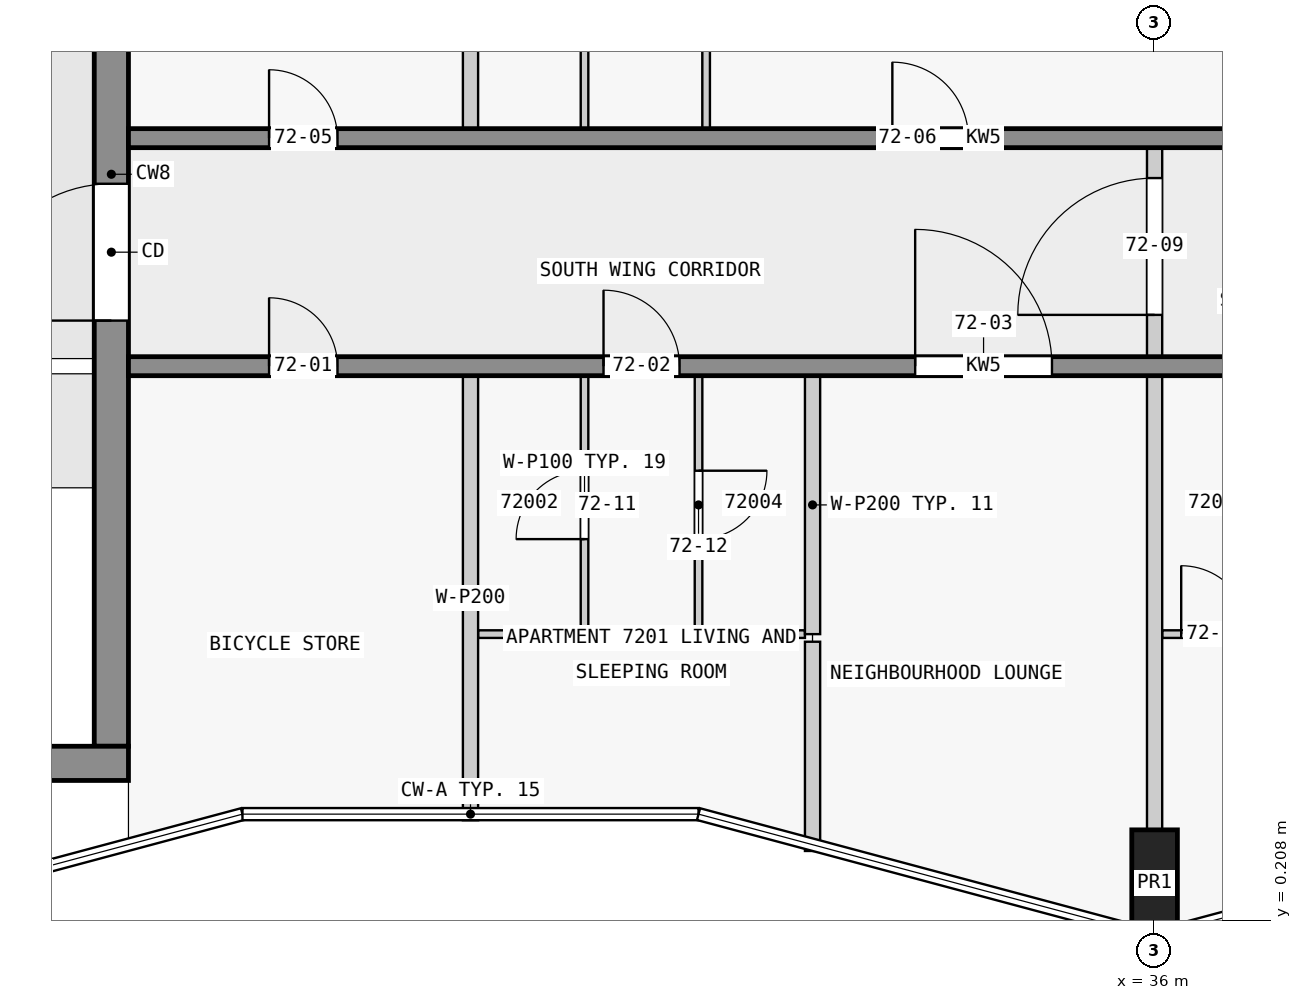
"""IFC4 building model, lengths in metres.
Left out: names, types, materials, properties, quantities, classifications, styles, units other than length and angle.
Written with IfcOpenShell. Run it as: python <this file> out.ifc"""

import sys

from ifc_helpers import new_model, si_unit, direction, frame, frame_2d, origin, origin_2d, place, context, subcontext, project, spatial, rectangle, extrude, element, fill, save


model = new_model("IFC4")
c1 = context("Model", 3, precision=1e-05, world=origin(), true_north=direction((0.0, 1.0)))
c2 = subcontext(c1, "Body", "Model", "MODEL_VIEW")
j1 = project(units=[si_unit("LENGTHUNIT", "METRE"), si_unit("PLANEANGLEUNIT", "RADIAN")], contexts=[c1])
p1 = place(None, origin())
s1 = spatial("IfcSite", under=j1, at=p1, CompositionType="ELEMENT")
p2 = place(p1, origin())
s2 = spatial("IfcBuilding", under=s1, at=p2, CompositionType="ELEMENT")
p3 = place(p2, frame((0.0, 0.0, 273.9)))
s3 = spatial("IfcBuildingStorey", under=s2, at=p3, CompositionType="ELEMENT", Elevation=273.9)
p4 = place(p3, frame((36.0, 0.7, 0.0), z_axis=(0.0, 0.0, 1.0), x_axis=(1.0, 0.0, 0.0)))
e1 = element("IfcColumn", 1, at=p4, inside=s3, PredefinedType="COLUMN", context=c2, shape_type="SweptSolid", body=[
    extrude(rectangle(XDim=0.6, YDim=1.4, at=origin_2d()), origin(), (0.0, 0.0, 1.0), 3.5),
])
p5 = place(p3, frame((1.85, 2.275, 0.0), z_axis=(0.0, 0.0, 1.0), x_axis=(1.0, 0.0, 0.0)))
e2 = element("IfcWall", 2, at=p5, inside=s3, PredefinedType="SHEAR", context=c2, shape_type="SweptSolid", body=[
    extrude(rectangle(XDim=20.65, YDim=0.45, at=frame_2d((10.325, 0.0))), origin(), (0.0, 0.0, 1.0), 3.25),
])
p6 = place(p3, frame((22.275, 2.5, 0.0), z_axis=(0.0, 0.0, 1.0), x_axis=(0.0, 1.0, 0.0)))
e3 = element("IfcWall", 3, at=p6, inside=s3, PredefinedType="SHEAR", context=c2, shape_type="SweptSolid", body=[
    extrude(rectangle(XDim=15.05, YDim=0.45, at=frame_2d((7.525, 0.0))), origin(), (0.0, 0.0, 1.0), 3.25),
])
p7 = place(p6, frame((5.6, 0.0, 0.0)))
e4 = element("IfcOpeningElement", 4, at=p7, cuts=e3, PredefinedType="OPENING", context=c2, shape_type="SweptSolid", body=[
    extrude(rectangle(XDim=1.8, YDim=2.1, at=frame_2d((0.9, 1.05))), frame((0.0, 0.235, 0.0), z_axis=(0.0, -1.0, 0.0), x_axis=(1.0, 0.0, 0.0)), (0.0, 0.0, 1.0), 0.47),
])
p8 = place(p3, frame((22.5, 7.5, 0.0), z_axis=(0.0, 0.0, 1.0), x_axis=(1.0, 0.0, 0.0)))
e5 = element("IfcWall", 5, at=p8, inside=s3, PredefinedType="SHEAR", context=c2, shape_type="SweptSolid", body=[
    extrude(rectangle(XDim=22.5, YDim=0.25, at=frame_2d((11.25, 0.0))), origin(), (0.0, 0.0, 1.0), 3.25),
])
p9 = place(p8, frame((1.85, 0.0, 0.0)))
e6 = element("IfcOpeningElement", 6, at=p9, cuts=e5, PredefinedType="OPENING", context=c2, shape_type="SweptSolid", body=[
    extrude(rectangle(XDim=0.9, YDim=2.1, at=frame_2d((0.45, 1.05))), frame((0.0, 0.135, 0.0), z_axis=(0.0, -1.0, 0.0), x_axis=(1.0, 0.0, 0.0)), (0.0, 0.0, 1.0), 0.27),
])
p10 = place(p8, frame((6.25, 0.0, 0.0)))
e7 = element("IfcOpeningElement", 7, at=p10, cuts=e5, PredefinedType="OPENING", context=c2, shape_type="SweptSolid", body=[
    extrude(rectangle(XDim=1.0, YDim=2.1, at=frame_2d((0.5, 1.05))), frame((0.0, 0.135, 0.0), z_axis=(0.0, -1.0, 0.0), x_axis=(1.0, 0.0, 0.0)), (0.0, 0.0, 1.0), 0.27),
])
p11 = place(p8, frame((10.35, 0.0, 0.0)))
e8 = element("IfcOpeningElement", 8, at=p11, cuts=e5, PredefinedType="OPENING", context=c2, shape_type="SweptSolid", body=[
    extrude(rectangle(XDim=1.8, YDim=2.1, at=frame_2d((0.9, 1.05))), frame((0.0, 0.135, 0.0), z_axis=(0.0, -1.0, 0.0), x_axis=(1.0, 0.0, 0.0)), (0.0, 0.0, 1.0), 0.27),
])
p12 = place(p8, frame((16.85, 0.0, 0.0)))
e9 = element("IfcOpeningElement", 9, at=p12, cuts=e5, PredefinedType="OPENING", context=c2, shape_type="SweptSolid", body=[
    extrude(rectangle(XDim=1.0, YDim=2.1, at=frame_2d((0.5, 1.05))), frame((0.0, 0.135, 0.0), z_axis=(0.0, -1.0, 0.0), x_axis=(1.0, 0.0, 0.0)), (0.0, 0.0, 1.0), 0.27),
])
p13 = place(p3, frame((22.5, 10.5, 0.0), z_axis=(0.0, 0.0, 1.0), x_axis=(1.0, 0.0, 0.0)))
e10 = element("IfcWall", 10, at=p13, inside=s3, PredefinedType="SHEAR", context=c2, shape_type="SweptSolid", body=[
    extrude(rectangle(XDim=22.5, YDim=0.25, at=frame_2d((11.25, 0.0))), origin(), (0.0, 0.0, 1.0), 3.25),
])
p14 = place(p13, frame((1.85, 0.0, 0.0)))
e11 = element("IfcOpeningElement", 11, at=p14, cuts=e10, PredefinedType="OPENING", context=c2, shape_type="SweptSolid", body=[
    extrude(rectangle(XDim=0.9, YDim=2.1, at=frame_2d((0.45, 1.05))), frame((0.0, 0.135, 0.0), z_axis=(0.0, -1.0, 0.0), x_axis=(1.0, 0.0, 0.0)), (0.0, 0.0, 1.0), 0.27),
])
p15 = place(p13, frame((10.05, 0.0, 0.0)))
e12 = element("IfcOpeningElement", 12, at=p15, cuts=e10, PredefinedType="OPENING", context=c2, shape_type="SweptSolid", body=[
    extrude(rectangle(XDim=1.0, YDim=2.1, at=frame_2d((0.5, 1.05))), frame((0.0, 0.135, 0.0), z_axis=(0.0, -1.0, 0.0), x_axis=(1.0, 0.0, 0.0)), (0.0, 0.0, 1.0), 0.27),
])
p16 = place(p13, frame((18.75, 0.0, 0.0)))
e13 = element("IfcOpeningElement", 13, at=p16, cuts=e10, PredefinedType="OPENING", context=c2, shape_type="SweptSolid", body=[
    extrude(rectangle(XDim=0.9, YDim=2.1, at=frame_2d((0.45, 1.05))), frame((0.0, 0.135, 0.0), z_axis=(0.0, -1.0, 0.0), x_axis=(1.0, 0.0, 0.0)), (0.0, 0.0, 1.0), 0.27),
])
p17 = place(p13, frame((20.95, 0.0, 0.0)))
e14 = element("IfcOpeningElement", 14, at=p17, cuts=e10, PredefinedType="OPENING", context=c2, shape_type="SweptSolid", body=[
    extrude(rectangle(XDim=1.0, YDim=2.1, at=frame_2d((0.5, 1.05))), frame((0.0, 0.135, 0.0), z_axis=(0.0, -1.0, 0.0), x_axis=(1.0, 0.0, 0.0)), (0.0, 0.0, 1.0), 0.27),
])
for number, where, z_axis, x_axis in (
    (15, (27.1, 3.975, 0.0), (0.0, 0.0, 1.0), (1.0, 0.0, 0.0)),
    (16, (30.05, 3.975, 0.0), (0.0, 0.0, 1.0), (1.0, 0.0, 0.0)),
):
    element("IfcWall", number, at=place(p3, frame(where, z_axis=z_axis, x_axis=x_axis)), inside=s3, PredefinedType="PARTITIONING", context=c2, shape_type="SweptSolid", body=[
        extrude(rectangle(XDim=1.35, YDim=0.1, at=frame_2d((0.675, 0.0))), origin(), (0.0, 0.0, 1.0), 3.25),
    ])
p18 = place(p3, frame((36.1, 3.975, 0.0), z_axis=(0.0, 0.0, 1.0), x_axis=(1.0, 0.0, 0.0)))
e17 = element("IfcWall", 17, at=p18, inside=s3, PredefinedType="PARTITIONING", context=c2, shape_type="SweptSolid", body=[
    extrude(rectangle(XDim=1.45, YDim=0.1, at=frame_2d((0.725, 0.0))), origin(), (0.0, 0.0, 1.0), 3.25),
])
p19 = place(p18, frame((0.25, 0.0, 0.0)))
e18 = element("IfcOpeningElement", 18, at=p19, cuts=e17, PredefinedType="OPENING", context=c2, shape_type="SweptSolid", body=[
    extrude(rectangle(XDim=0.9, YDim=2.1, at=frame_2d((0.45, 1.05))), frame((0.0, 0.06, 0.0), z_axis=(0.0, -1.0, 0.0), x_axis=(1.0, 0.0, 0.0)), (0.0, 0.0, 1.0), 0.12),
])
for number, where, z_axis, x_axis in (
    (19, (27.0, 1.527, 0.0), (0.0, 0.0, 1.0), (0.0, 1.0, 0.0)),
    (20, (27.0, 10.625, 0.0), (0.0, 0.0, 1.0), (0.0, 1.0, 0.0)),
):
    element("IfcWall", number, at=place(p3, frame(where, z_axis=z_axis, x_axis=x_axis)), inside=s3, PredefinedType="PARTITIONING", context=c2, shape_type="SweptSolid", body=[
        extrude(rectangle(XDim=5.848, YDim=0.2, at=frame_2d((2.924, 0.0))), origin(), (0.0, 0.0, 1.0), 3.25),
    ])
p20 = place(p3, frame((28.5, 3.975, 0.0), z_axis=(0.0, 0.0, 1.0), x_axis=(0.0, 1.0, 0.0)))
e21 = element("IfcWall", 21, at=p20, inside=s3, PredefinedType="PARTITIONING", context=c2, shape_type="SweptSolid", body=[
    extrude(rectangle(XDim=3.4, YDim=0.1, at=frame_2d((1.7, 0.0))), origin(), (0.0, 0.0, 1.0), 3.25),
])
p21 = place(p20, frame((1.25, 0.0, 0.0)))
e22 = element("IfcOpeningElement", 22, at=p21, cuts=e21, PredefinedType="OPENING", context=c2, shape_type="SweptSolid", body=[
    extrude(rectangle(XDim=0.9, YDim=2.1, at=frame_2d((0.45, 1.05))), frame((0.0, 0.06, 0.0), z_axis=(0.0, -1.0, 0.0), x_axis=(1.0, 0.0, 0.0)), (0.0, 0.0, 1.0), 0.12),
])
p22 = place(p3, frame((28.5, 10.625, 0.0), z_axis=(0.0, 0.0, 1.0), x_axis=(0.0, 1.0, 0.0)))
e23 = element("IfcWall", 23, at=p22, inside=s3, PredefinedType="PARTITIONING", context=c2, shape_type="SweptSolid", body=[
    extrude(rectangle(XDim=3.4, YDim=0.1, at=frame_2d((1.7, 0.0))), origin(), (0.0, 0.0, 1.0), 3.25),
])
p23 = place(p3, frame((30.0, 7.375, 0.0), z_axis=(0.0, 0.0, 1.0), x_axis=(0.0, -1.0, 0.0)))
e24 = element("IfcWall", 24, at=p23, inside=s3, PredefinedType="PARTITIONING", context=c2, shape_type="SweptSolid", body=[
    extrude(rectangle(XDim=3.4, YDim=0.1, at=frame_2d((1.7, 0.0))), origin(), (0.0, 0.0, 1.0), 3.25),
])
p24 = place(p23, frame((1.25, 0.0, 0.0)))
e25 = element("IfcOpeningElement", 25, at=p24, cuts=e24, PredefinedType="OPENING", context=c2, shape_type="SweptSolid", body=[
    extrude(rectangle(XDim=0.9, YDim=2.1, at=frame_2d((0.45, 1.05))), frame((0.0, 0.06, 0.0), z_axis=(0.0, -1.0, 0.0), x_axis=(1.0, 0.0, 0.0)), (0.0, 0.0, 1.0), 0.12),
])
p25 = place(p3, frame((30.1, 10.625, 0.0), z_axis=(0.0, 0.0, 1.0), x_axis=(0.0, 1.0, 0.0)))
e26 = element("IfcWall", 26, at=p25, inside=s3, PredefinedType="PARTITIONING", context=c2, shape_type="SweptSolid", body=[
    extrude(rectangle(XDim=3.4, YDim=0.1, at=frame_2d((1.7, 0.0))), origin(), (0.0, 0.0, 1.0), 3.25),
])
p26 = place(p25, frame((1.25, 0.0, 0.0)))
e27 = element("IfcOpeningElement", 27, at=p26, cuts=e26, PredefinedType="OPENING", context=c2, shape_type="SweptSolid", body=[
    extrude(rectangle(XDim=0.9, YDim=2.1, at=frame_2d((0.45, 1.05))), frame((0.0, 0.06, 0.0), z_axis=(0.0, -1.0, 0.0), x_axis=(1.0, 0.0, 0.0)), (0.0, 0.0, 1.0), 0.12),
])
p27 = place(p3, frame((31.5, 3.875, 0.0), z_axis=(0.0, 0.0, 1.0), x_axis=(0.0, -1.0, 0.0)))
e28 = element("IfcWall", 28, at=p27, inside=s3, PredefinedType="PARTITIONING", context=c2, shape_type="SweptSolid", body=[
    extrude(rectangle(XDim=2.753, YDim=0.2, at=frame_2d((1.376, 0.0))), origin(), (0.0, 0.0, 1.0), 3.25),
])
p28 = place(p3, frame((31.5, 3.975, 0.0), z_axis=(0.0, 0.0, 1.0), x_axis=(0.0, 1.0, 0.0)))
e29 = element("IfcWall", 29, at=p28, inside=s3, PredefinedType="PARTITIONING", context=c2, shape_type="SweptSolid", body=[
    extrude(rectangle(XDim=3.4, YDim=0.2, at=frame_2d((1.7, 0.0))), origin(), (0.0, 0.0, 1.0), 3.25),
])
p29 = place(p3, frame((36.0, 1.4, 0.0), z_axis=(0.0, 0.0, 1.0), x_axis=(0.0, 1.0, 0.0)))
e30 = element("IfcWall", 30, at=p29, inside=s3, PredefinedType="PARTITIONING", context=c2, shape_type="SweptSolid", body=[
    extrude(rectangle(XDim=5.975, YDim=0.2, at=frame_2d((2.988, 0.0))), origin(), (0.0, 0.0, 1.0), 3.25),
])
p30 = place(p3, frame((36.0, 7.475, 0.0), z_axis=(0.0, 0.0, 1.0), x_axis=(0.0, 1.0, 0.0)))
e31 = element("IfcWall", 31, at=p30, inside=s3, PredefinedType="PARTITIONING", context=c2, shape_type="SweptSolid", body=[
    extrude(rectangle(XDim=3.15, YDim=0.2, at=frame_2d((1.575, 0.0))), origin(), (0.0, 0.0, 1.0), 3.25),
])
p31 = place(p30, frame((0.7, 0.0, 0.0)))
e32 = element("IfcOpeningElement", 32, at=p31, cuts=e31, PredefinedType="OPENING", context=c2, shape_type="SweptSolid", body=[
    extrude(rectangle(XDim=1.8, YDim=2.1, at=frame_2d((0.9, 1.05))), frame((0.0, 0.11, 0.0), z_axis=(0.0, -1.0, 0.0), x_axis=(1.0, 0.0, 0.0)), (0.0, 0.0, 1.0), 0.22),
])
p32 = place(p7, origin())
e33 = element("IfcDoor", 33, at=p32, inside=s3, OperationType="DOUBLE_DOOR_SINGLE_SWING", PredefinedType="DOOR", context=c2, shape_type="SweptSolid", body=[
    extrude(rectangle(XDim=1.8, YDim=2.1, at=frame_2d((0.9, 1.05))), frame((0.0, 0.025, 0.0), z_axis=(0.0, -1.0, 0.0), x_axis=(1.0, 0.0, 0.0)), (0.0, 0.0, 1.0), 0.05),
])
fill(e4, e33)
p33 = place(p9, origin())
e34 = element("IfcDoor", 34, at=p33, inside=s3, OperationType="SINGLE_SWING_LEFT", PredefinedType="DOOR", context=c2, shape_type="SweptSolid", body=[
    extrude(rectangle(XDim=0.9, YDim=2.1, at=frame_2d((0.45, 1.05))), frame((0.0, 0.025, 0.0), z_axis=(0.0, -1.0, 0.0), x_axis=(1.0, 0.0, 0.0)), (0.0, 0.0, 1.0), 0.05),
])
fill(e6, e34)
p34 = place(p10, origin())
e35 = element("IfcDoor", 35, at=p34, inside=s3, OperationType="SINGLE_SWING_LEFT", PredefinedType="DOOR", context=c2, shape_type="SweptSolid", body=[
    extrude(rectangle(XDim=1.0, YDim=2.1, at=frame_2d((0.5, 1.05))), frame((0.0, 0.025, 0.0), z_axis=(0.0, -1.0, 0.0), x_axis=(1.0, 0.0, 0.0)), (0.0, 0.0, 1.0), 0.05),
])
fill(e7, e35)
p35 = place(p11, origin())
e36 = element("IfcDoor", 36, at=p35, inside=s3, OperationType="SINGLE_SWING_LEFT", PredefinedType="DOOR", context=c2, shape_type="SweptSolid", body=[
    extrude(rectangle(XDim=1.8, YDim=2.1, at=frame_2d((0.9, 1.05))), frame((0.0, 0.025, 0.0), z_axis=(0.0, -1.0, 0.0), x_axis=(1.0, 0.0, 0.0)), (0.0, 0.0, 1.0), 0.05),
])
fill(e8, e36)
p36 = place(p14, origin())
e37 = element("IfcDoor", 37, at=p36, inside=s3, OperationType="SINGLE_SWING_LEFT", PredefinedType="DOOR", context=c2, shape_type="SweptSolid", body=[
    extrude(rectangle(XDim=0.9, YDim=2.1, at=frame_2d((0.45, 1.05))), frame((0.0, 0.025, 0.0), z_axis=(0.0, -1.0, 0.0), x_axis=(1.0, 0.0, 0.0)), (0.0, 0.0, 1.0), 0.05),
])
fill(e11, e37)
p37 = place(p15, origin())
e38 = element("IfcDoor", 38, at=p37, inside=s3, OperationType="SINGLE_SWING_LEFT", PredefinedType="DOOR", context=c2, shape_type="SweptSolid", body=[
    extrude(rectangle(XDim=1.0, YDim=2.1, at=frame_2d((0.5, 1.05))), frame((0.0, 0.025, 0.0), z_axis=(0.0, -1.0, 0.0), x_axis=(1.0, 0.0, 0.0)), (0.0, 0.0, 1.0), 0.05),
])
fill(e12, e38)
p38 = place(p31, origin())
e39 = element("IfcDoor", 39, at=p38, inside=s3, OperationType="SINGLE_SWING_RIGHT", PredefinedType="DOOR", context=c2, shape_type="SweptSolid", body=[
    extrude(rectangle(XDim=1.8, YDim=2.1, at=frame_2d((0.9, 1.05))), frame((0.0, 0.025, 0.0), z_axis=(0.0, -1.0, 0.0), x_axis=(1.0, 0.0, 0.0)), (0.0, 0.0, 1.0), 0.05),
])
fill(e32, e39)
p39 = place(p21, origin())
e40 = element("IfcDoor", 40, at=p39, inside=s3, OperationType="SINGLE_SWING_LEFT", PredefinedType="DOOR", context=c2, shape_type="SweptSolid", body=[
    extrude(rectangle(XDim=0.9, YDim=2.1, at=frame_2d((0.45, 1.05))), frame((0.0, 0.025, 0.0), z_axis=(0.0, -1.0, 0.0), x_axis=(1.0, 0.0, 0.0)), (0.0, 0.0, 1.0), 0.05),
])
fill(e22, e40)
p40 = place(p24, origin())
e41 = element("IfcDoor", 41, at=p40, inside=s3, OperationType="SINGLE_SWING_LEFT", PredefinedType="DOOR", context=c2, shape_type="SweptSolid", body=[
    extrude(rectangle(XDim=0.9, YDim=2.1, at=frame_2d((0.45, 1.05))), frame((0.0, 0.025, 0.0), z_axis=(0.0, -1.0, 0.0), x_axis=(1.0, 0.0, 0.0)), (0.0, 0.0, 1.0), 0.05),
])
fill(e25, e41)
p41 = place(p19, origin())
e42 = element("IfcDoor", 42, at=p41, inside=s3, OperationType="SINGLE_SWING_LEFT", PredefinedType="DOOR", context=c2, shape_type="SweptSolid", body=[
    extrude(rectangle(XDim=0.9, YDim=2.1, at=frame_2d((0.45, 1.05))), frame((0.0, 0.025, 0.0), z_axis=(0.0, -1.0, 0.0), x_axis=(1.0, 0.0, 0.0)), (0.0, 0.0, 1.0), 0.05),
])
fill(e18, e42)
save(model, sys.argv[1])
